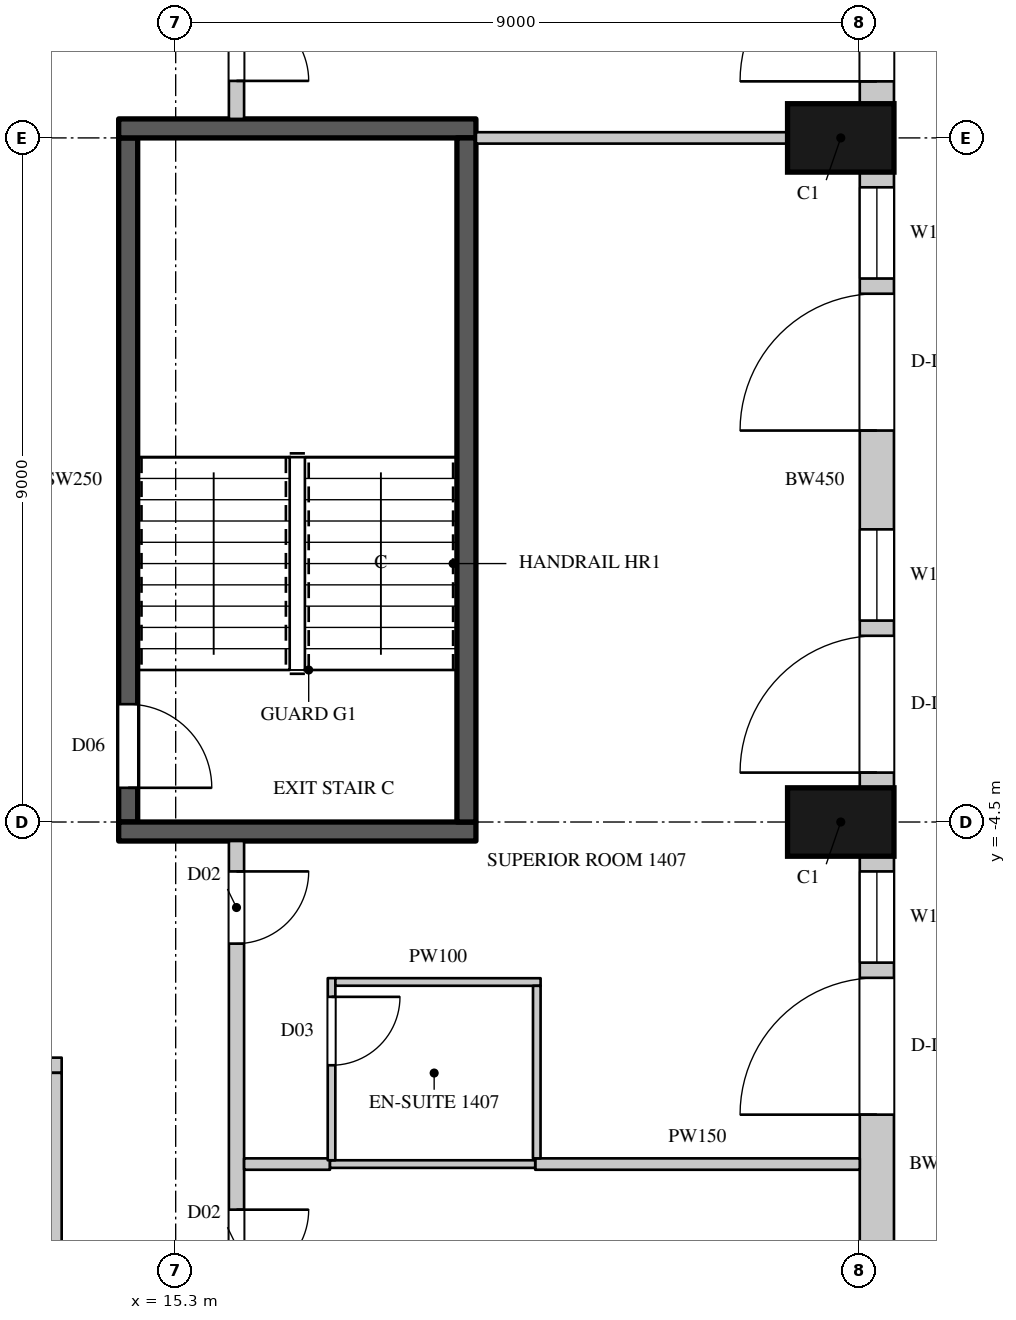
"""IFC4 building model, lengths in metres.
Left out: names, types, materials, properties, quantities, classifications, styles, units other than length and angle.
Written with IfcOpenShell. Run it as: python <this file> out.ifc"""

import sys

from ifc_helpers import new_model, si_unit, direction, frame, frame_2d, origin, origin_2d, place, context, subcontext, project, spatial, rectangle, extrude, element, fill, save


model = new_model("IFC4")
c1 = context("Model", 3, precision=1e-05, world=origin(), true_north=direction((0.0, 1.0)))
c2 = subcontext(c1, "Body", "Model", "MODEL_VIEW")
j1 = project(units=[si_unit("LENGTHUNIT", "METRE"), si_unit("PLANEANGLEUNIT", "RADIAN")], contexts=[c1])
p1 = place(None, origin())
s1 = spatial("IfcSite", under=j1, at=p1, CompositionType="ELEMENT")
p2 = place(p1, origin())
s2 = spatial("IfcBuilding", under=s1, at=p2, CompositionType="ELEMENT")
p3 = place(p2, frame((0.0, 0.0, 80.7)))
s3 = spatial("IfcBuildingStorey", under=s2, at=p3, CompositionType="ELEMENT", Elevation=80.7)
for number, where, z_axis, x_axis in (
    (1, (24.05, -4.5, 0.0), (0.0, 0.0, 1.0), (0.0, 1.0, 0.0)),
    (2, (24.05, 4.5, 0.0), (0.0, 0.0, 1.0), (0.0, 1.0, 0.0)),
):
    element("IfcColumn", number, at=place(p3, frame(where, z_axis=z_axis, x_axis=x_axis)), inside=s3, PredefinedType="COLUMN", context=c2, shape_type="SweptSolid", body=[
        extrude(rectangle(XDim=0.9, YDim=1.4, at=origin_2d()), origin(), (0.0, 0.0, 1.0), 3.6),
    ])
p4 = place(p3, frame((24.525, -13.05, 0.0), z_axis=(0.0, 0.0, 1.0), x_axis=(0.0, 1.0, 0.0)))
e3 = element("IfcWall", 3, at=p4, inside=s3, PredefinedType="SOLIDWALL", context=c2, shape_type="SweptSolid", body=[
    extrude(rectangle(XDim=8.1, YDim=0.45, at=frame_2d((4.05, 0.0))), origin(), (0.0, 0.0, 1.0), 3.3),
])
p5 = place(p4, frame((0.9, 0.0, 0.0)))
e4 = element("IfcOpeningElement", 4, at=p5, cuts=e3, PredefinedType="OPENING", context=c2, shape_type="SweptSolid", body=[
    extrude(rectangle(XDim=1.8, YDim=2.4, at=frame_2d((0.9, 1.2))), frame((0.0, 0.235, 0.0), z_axis=(0.0, -1.0, 0.0), x_axis=(1.0, 0.0, 0.0)), (0.0, 0.0, 1.0), 0.47),
])
p6 = place(p4, frame((4.7, 0.0, 0.0)))
e5 = element("IfcOpeningElement", 5, at=p6, cuts=e3, PredefinedType="OPENING", context=c2, shape_type="SweptSolid", body=[
    extrude(rectangle(XDim=1.8, YDim=2.4, at=frame_2d((0.9, 1.2))), frame((0.0, 0.235, 0.0), z_axis=(0.0, -1.0, 0.0), x_axis=(1.0, 0.0, 0.0)), (0.0, 0.0, 1.0), 0.47),
])
p7 = place(p4, frame((6.7, 0.0, 1.05)))
e6 = element("IfcOpeningElement", 6, at=p7, cuts=e3, PredefinedType="OPENING", context=c2, shape_type="SweptSolid", body=[
    extrude(rectangle(XDim=1.2, YDim=2.0, at=frame_2d((0.6, 1.0))), frame((0.0, 0.235, 0.0), z_axis=(0.0, -1.0, 0.0), x_axis=(1.0, 0.0, 0.0)), (0.0, 0.0, 1.0), 0.47),
])
p8 = place(p3, frame((24.525, -4.05, 0.0), z_axis=(0.0, 0.0, 1.0), x_axis=(0.0, 1.0, 0.0)))
e7 = element("IfcWall", 7, at=p8, inside=s3, PredefinedType="SOLIDWALL", context=c2, shape_type="SweptSolid", body=[
    extrude(rectangle(XDim=8.1, YDim=0.45, at=frame_2d((4.05, 0.0))), origin(), (0.0, 0.0, 1.0), 3.3),
])
p9 = place(p8, frame((0.2, 0.0, 0.0)))
e8 = element("IfcOpeningElement", 8, at=p9, cuts=e7, PredefinedType="OPENING", context=c2, shape_type="SweptSolid", body=[
    extrude(rectangle(XDim=1.8, YDim=2.4, at=frame_2d((0.9, 1.2))), frame((0.0, 0.235, 0.0), z_axis=(0.0, -1.0, 0.0), x_axis=(1.0, 0.0, 0.0)), (0.0, 0.0, 1.0), 0.47),
])
p10 = place(p8, frame((2.2, 0.0, 1.05)))
e9 = element("IfcOpeningElement", 9, at=p10, cuts=e7, PredefinedType="OPENING", context=c2, shape_type="SweptSolid", body=[
    extrude(rectangle(XDim=1.2, YDim=2.0, at=frame_2d((0.6, 1.0))), frame((0.0, 0.235, 0.0), z_axis=(0.0, -1.0, 0.0), x_axis=(1.0, 0.0, 0.0)), (0.0, 0.0, 1.0), 0.47),
])
p11 = place(p8, frame((4.7, 0.0, 0.0)))
e10 = element("IfcOpeningElement", 10, at=p11, cuts=e7, PredefinedType="OPENING", context=c2, shape_type="SweptSolid", body=[
    extrude(rectangle(XDim=1.8, YDim=2.4, at=frame_2d((0.9, 1.2))), frame((0.0, 0.235, 0.0), z_axis=(0.0, -1.0, 0.0), x_axis=(1.0, 0.0, 0.0)), (0.0, 0.0, 1.0), 0.47),
])
p12 = place(p8, frame((6.7, 0.0, 1.05)))
e11 = element("IfcOpeningElement", 11, at=p12, cuts=e7, PredefinedType="OPENING", context=c2, shape_type="SweptSolid", body=[
    extrude(rectangle(XDim=1.2, YDim=2.0, at=frame_2d((0.6, 1.0))), frame((0.0, 0.235, 0.0), z_axis=(0.0, -1.0, 0.0), x_axis=(1.0, 0.0, 0.0)), (0.0, 0.0, 1.0), 0.47),
])
p13 = place(p3, frame((24.525, 4.95, 0.0), z_axis=(0.0, 0.0, 1.0), x_axis=(0.0, 1.0, 0.0)))
e12 = element("IfcWall", 12, at=p13, inside=s3, PredefinedType="SOLIDWALL", context=c2, shape_type="SweptSolid", body=[
    extrude(rectangle(XDim=8.439, YDim=0.45, at=frame_2d((4.219, 0.0))), origin(), (0.0, 0.0, 1.0), 3.3),
])
p14 = place(p13, frame((0.294, 0.0, 0.0)))
e13 = element("IfcOpeningElement", 13, at=p14, cuts=e12, PredefinedType="OPENING", context=c2, shape_type="SweptSolid", body=[
    extrude(rectangle(XDim=1.8, YDim=2.4, at=frame_2d((0.9, 1.2))), frame((0.0, 0.235, 0.0), z_axis=(0.0, -1.0, 0.0), x_axis=(1.0, 0.0, 0.0)), (0.0, 0.0, 1.0), 0.47),
])
p15 = place(p13, frame((2.294, 0.0, 1.05)))
e14 = element("IfcOpeningElement", 14, at=p15, cuts=e12, PredefinedType="OPENING", context=c2, shape_type="SweptSolid", body=[
    extrude(rectangle(XDim=1.2, YDim=2.0, at=frame_2d((0.6, 1.0))), frame((0.0, 0.235, 0.0), z_axis=(0.0, -1.0, 0.0), x_axis=(1.0, 0.0, 0.0)), (0.0, 0.0, 1.0), 0.47),
])
p16 = place(p13, frame((5.232, 0.0, 1.05)))
e15 = element("IfcOpeningElement", 15, at=p16, cuts=e12, PredefinedType="OPENING", context=c2, shape_type="SweptSolid", body=[
    extrude(rectangle(XDim=2.7, YDim=2.0, at=frame_2d((1.35, 1.0))), frame((0.0, 0.235, 0.0), z_axis=(0.0, -1.0, 0.0), x_axis=(1.0, 0.0, 0.0)), (0.0, 0.0, 1.0), 0.47),
])
p17 = place(p3, frame((10.1, -7.7, 0.0), z_axis=(0.0, 0.0, 1.0), x_axis=(1.0, 0.0, 0.0)))
e16 = element("IfcWall", 16, at=p17, inside=s3, PredefinedType="PARTITIONING", context=c2, shape_type="SweptSolid", body=[
    extrude(rectangle(XDim=3.7, YDim=0.2, at=frame_2d((1.85, 0.0))), origin(), (0.0, 0.0, 1.0), 3.3),
])
p18 = place(p17, frame((2.45, 0.0, 0.0)))
e17 = element("IfcOpeningElement", 17, at=p18, cuts=e16, PredefinedType="OPENING", context=c2, shape_type="SweptSolid", body=[
    extrude(rectangle(XDim=0.9, YDim=2.2, at=frame_2d((0.45, 1.1))), frame((0.0, 0.11, 0.0), z_axis=(0.0, -1.0, 0.0), x_axis=(1.0, 0.0, 0.0)), (0.0, 0.0, 1.0), 0.22),
])
p19 = place(p3, frame((13.7, -15.0, 0.0), z_axis=(0.0, 0.0, 1.0), x_axis=(0.0, 1.0, 0.0)))
e18 = element("IfcWall", 18, at=p19, inside=s3, PredefinedType="PARTITIONING", context=c2, shape_type="SweptSolid", body=[
    extrude(rectangle(XDim=7.2, YDim=0.2, at=frame_2d((3.6, 0.0))), origin(), (0.0, 0.0, 1.0), 3.3),
])
p20 = place(p3, frame((16.1, -17.5, 0.0), z_axis=(0.0, 0.0, 1.0), x_axis=(0.0, 1.0, 0.0)))
e19 = element("IfcWall", 19, at=p20, inside=s3, PredefinedType="PARTITIONING", context=c2, shape_type="SweptSolid", body=[
    extrude(rectangle(XDim=12.75, YDim=0.2, at=frame_2d((6.375, 0.0))), origin(), (0.0, 0.0, 1.0), 3.3),
])
p21 = place(p20, frame((2.75, 0.0, 0.0)))
e20 = element("IfcOpeningElement", 20, at=p21, cuts=e19, PredefinedType="OPENING", context=c2, shape_type="SweptSolid", body=[
    extrude(rectangle(XDim=0.95, YDim=2.2, at=frame_2d((0.475, 1.1))), frame((0.0, 0.11, 0.0), z_axis=(0.0, -1.0, 0.0), x_axis=(1.0, 0.0, 0.0)), (0.0, 0.0, 1.0), 0.22),
])
p22 = place(p20, frame((6.95, 0.0, 0.0)))
e21 = element("IfcOpeningElement", 21, at=p22, cuts=e19, PredefinedType="OPENING", context=c2, shape_type="SweptSolid", body=[
    extrude(rectangle(XDim=0.95, YDim=2.2, at=frame_2d((0.475, 1.1))), frame((0.0, 0.11, 0.0), z_axis=(0.0, -1.0, 0.0), x_axis=(1.0, 0.0, 0.0)), (0.0, 0.0, 1.0), 0.22),
])
p23 = place(p20, frame((11.4, 0.0, 0.0)))
e22 = element("IfcOpeningElement", 22, at=p23, cuts=e19, PredefinedType="OPENING", context=c2, shape_type="SweptSolid", body=[
    extrude(rectangle(XDim=0.95, YDim=2.2, at=frame_2d((0.475, 1.1))), frame((0.0, 0.11, 0.0), z_axis=(0.0, -1.0, 0.0), x_axis=(1.0, 0.0, 0.0)), (0.0, 0.0, 1.0), 0.22),
])
p24 = place(p3, frame((16.1, 4.75, 0.0), z_axis=(0.0, 0.0, 1.0), x_axis=(0.0, 1.0, 0.0)))
e23 = element("IfcWall", 23, at=p24, inside=s3, PredefinedType="PARTITIONING", context=c2, shape_type="SweptSolid", body=[
    extrude(rectangle(XDim=12.65, YDim=0.2, at=frame_2d((6.325, 0.0))), origin(), (0.0, 0.0, 1.0), 3.3),
])
p25 = place(p24, frame((0.5, 0.0, 0.0)))
e24 = element("IfcOpeningElement", 24, at=p25, cuts=e23, PredefinedType="OPENING", context=c2, shape_type="SweptSolid", body=[
    extrude(rectangle(XDim=0.95, YDim=2.2, at=frame_2d((0.475, 1.1))), frame((0.0, 0.11, 0.0), z_axis=(0.0, -1.0, 0.0), x_axis=(1.0, 0.0, 0.0)), (0.0, 0.0, 1.0), 0.22),
])
p26 = place(p24, frame((6.9, 0.0, 0.0)))
e25 = element("IfcOpeningElement", 25, at=p26, cuts=e23, PredefinedType="OPENING", context=c2, shape_type="SweptSolid", body=[
    extrude(rectangle(XDim=0.95, YDim=2.2, at=frame_2d((0.475, 1.1))), frame((0.0, 0.11, 0.0), z_axis=(0.0, -1.0, 0.0), x_axis=(1.0, 0.0, 0.0)), (0.0, 0.0, 1.0), 0.22),
])
p27 = place(p3, frame((16.2, -9.0, 0.0), z_axis=(0.0, 0.0, 1.0), x_axis=(1.0, 0.0, 0.0)))
e26 = element("IfcWall", 26, at=p27, inside=s3, PredefinedType="PARTITIONING", context=c2, shape_type="SweptSolid", body=[
    extrude(rectangle(XDim=1.13, YDim=0.15, at=frame_2d((0.565, 0.0))), origin(), (0.0, 0.0, 1.0), 2.65),
])
p28 = place(p3, frame((19.25, 4.5, 0.0), z_axis=(0.0, 0.0, 1.0), x_axis=(1.0, 0.0, 0.0)))
e27 = element("IfcWall", 27, at=p28, inside=s3, PredefinedType="PARTITIONING", context=c2, shape_type="SweptSolid", body=[
    extrude(rectangle(XDim=4.1, YDim=0.15, at=frame_2d((2.05, 0.0))), origin(), (0.0, 0.0, 1.0), 3.3),
])
p29 = place(p3, frame((20.03, -9.0, 0.0), z_axis=(0.0, 0.0, 1.0), x_axis=(1.0, 0.0, 0.0)))
e28 = element("IfcWall", 28, at=p29, inside=s3, PredefinedType="PARTITIONING", context=c2, shape_type="SweptSolid", body=[
    extrude(rectangle(XDim=4.27, YDim=0.15, at=frame_2d((2.135, 0.0))), origin(), (0.0, 0.0, 1.0), 2.65),
])
p30 = place(p3, frame((14.675, -4.5, 0.0), z_axis=(0.0, 0.0, 1.0), x_axis=(0.0, 1.0, 0.0)))
e29 = element("IfcWall", 29, at=p30, inside=s3, PredefinedType="SHEAR", context=c2, shape_type="SweptSolid", body=[
    extrude(rectangle(XDim=9.0, YDim=0.25, at=frame_2d((4.5, 0.0))), origin(), (0.0, 0.0, 1.0), 3.3),
])
p31 = place(p30, frame((0.45, 0.0, 0.0)))
e30 = element("IfcOpeningElement", 30, at=p31, cuts=e29, PredefinedType="OPENING", context=c2, shape_type="SweptSolid", body=[
    extrude(rectangle(XDim=1.1, YDim=2.2, at=frame_2d((0.55, 1.1))), frame((0.0, 0.135, 0.0), z_axis=(0.0, -1.0, 0.0), x_axis=(1.0, 0.0, 0.0)), (0.0, 0.0, 1.0), 0.27),
])
for number, where, z_axis, x_axis in (
    (31, (14.55, -4.625, 0.0), (0.0, 0.0, 1.0), (1.0, 0.0, 0.0)),
    (32, (14.55, 4.625, 0.0), (0.0, 0.0, 1.0), (1.0, 0.0, 0.0)),
):
    element("IfcWall", number, at=place(p3, frame(where, z_axis=z_axis, x_axis=x_axis)), inside=s3, PredefinedType="SHEAR", context=c2, shape_type="SweptSolid", body=[
        extrude(rectangle(XDim=4.7, YDim=0.25, at=frame_2d((2.35, 0.0))), origin(), (0.0, 0.0, 1.0), 3.3),
    ])
p32 = place(p3, frame((19.125, -4.5, 0.0), z_axis=(0.0, 0.0, 1.0), x_axis=(0.0, 1.0, 0.0)))
e33 = element("IfcWall", 33, at=p32, inside=s3, PredefinedType="SHEAR", context=c2, shape_type="SweptSolid", body=[
    extrude(rectangle(XDim=9.0, YDim=0.25, at=frame_2d((4.5, 0.0))), origin(), (0.0, 0.0, 1.0), 3.3),
])
p33 = place(p3, frame((17.33, -9.0, 0.0), z_axis=(0.0, 0.0, 1.0), x_axis=(1.0, 0.0, 0.0)))
e34 = element("IfcWall", 34, at=p33, inside=s3, PredefinedType="PARTITIONING", context=c2, shape_type="SweptSolid", body=[
    extrude(rectangle(XDim=2.7, YDim=0.1, at=frame_2d((1.35, 0.0))), origin(), (0.0, 0.0, 1.0), 2.65),
])
p34 = place(p3, frame((17.35, -8.95, 0.0), z_axis=(0.0, 0.0, 1.0), x_axis=(0.000407580973, 0.999999916939, 0.0)))
e35 = element("IfcWall", 35, at=p34, inside=s3, PredefinedType="PARTITIONING", context=c2, shape_type="SweptSolid", body=[
    extrude(rectangle(XDim=2.396, YDim=0.1, at=frame_2d((1.198, 0.0))), origin(), (0.0, 0.0, 1.0), 3.3),
])
p35 = place(p34, frame((1.25, 0.0, 0.0)))
e36 = element("IfcOpeningElement", 36, at=p35, cuts=e35, PredefinedType="OPENING", context=c2, shape_type="SweptSolid", body=[
    extrude(rectangle(XDim=0.9, YDim=2.2, at=frame_2d((0.45, 1.1))), frame((0.0, 0.06, 0.0), z_axis=(0.0, -1.0, 0.0), x_axis=(1.0, 0.0, 0.0)), (0.0, 0.0, 1.0), 0.12),
])
p36 = place(p3, frame((17.401, -6.604, 0.0), z_axis=(0.0, 0.0, 1.0), x_axis=(0.9999999346, -0.000361663629, 0.0)))
e37 = element("IfcWall", 37, at=p36, inside=s3, PredefinedType="PARTITIONING", context=c2, shape_type="SweptSolid", body=[
    extrude(rectangle(XDim=2.7, YDim=0.1, at=frame_2d((1.35, 0.0))), origin(), (0.0, 0.0, 1.0), 3.3),
])
p37 = place(p3, frame((20.05, -8.925, 0.0), z_axis=(0.0, 0.0, 1.0), x_axis=(0.000430200003, 0.999999907464, 0.0)))
e38 = element("IfcWall", 38, at=p37, inside=s3, PredefinedType="PARTITIONING", context=c2, shape_type="SweptSolid", body=[
    extrude(rectangle(XDim=2.27, YDim=0.1, at=frame_2d((1.135, 0.0))), origin(), (0.0, 0.0, 1.0), 3.3),
])
p38 = place(p6, origin())
e39 = element("IfcDoor", 39, at=p38, inside=s3, OperationType="SLIDING_TO_LEFT", PredefinedType="DOOR", context=c2, shape_type="SweptSolid", body=[
    extrude(rectangle(XDim=1.8, YDim=2.4, at=frame_2d((0.9, 1.2))), frame((0.0, 0.13, 0.0), z_axis=(0.0, -1.0, 0.0), x_axis=(1.0, 0.0, 0.0)), (0.0, 0.0, 1.0), 0.05),
])
fill(e5, e39)
p39 = place(p7, origin())
e40 = element("IfcWindow", 40, at=p39, inside=s3, PartitioningType="SINGLE_PANEL", PredefinedType="WINDOW", context=c2, shape_type="SweptSolid", body=[
    extrude(rectangle(XDim=1.2, YDim=2.0, at=frame_2d((0.6, 1.0))), frame((0.0, 0.135, 0.0), z_axis=(0.0, -1.0, 0.0), x_axis=(1.0, 0.0, 0.0)), (0.0, 0.0, 1.0), 0.06),
])
fill(e6, e40)
p40 = place(p9, origin())
e41 = element("IfcDoor", 41, at=p40, inside=s3, OperationType="SLIDING_TO_LEFT", PredefinedType="DOOR", context=c2, shape_type="SweptSolid", body=[
    extrude(rectangle(XDim=1.8, YDim=2.4, at=frame_2d((0.9, 1.2))), frame((0.0, 0.13, 0.0), z_axis=(0.0, -1.0, 0.0), x_axis=(1.0, 0.0, 0.0)), (0.0, 0.0, 1.0), 0.05),
])
fill(e8, e41)
p41 = place(p10, origin())
e42 = element("IfcWindow", 42, at=p41, inside=s3, PartitioningType="SINGLE_PANEL", PredefinedType="WINDOW", context=c2, shape_type="SweptSolid", body=[
    extrude(rectangle(XDim=1.2, YDim=2.0, at=frame_2d((0.6, 1.0))), frame((0.0, 0.135, 0.0), z_axis=(0.0, -1.0, 0.0), x_axis=(1.0, 0.0, 0.0)), (0.0, 0.0, 1.0), 0.06),
])
fill(e9, e42)
p42 = place(p11, origin())
e43 = element("IfcDoor", 43, at=p42, inside=s3, OperationType="SLIDING_TO_LEFT", PredefinedType="DOOR", context=c2, shape_type="SweptSolid", body=[
    extrude(rectangle(XDim=1.8, YDim=2.4, at=frame_2d((0.9, 1.2))), frame((0.0, 0.13, 0.0), z_axis=(0.0, -1.0, 0.0), x_axis=(1.0, 0.0, 0.0)), (0.0, 0.0, 1.0), 0.05),
])
fill(e10, e43)
p43 = place(p12, origin())
e44 = element("IfcWindow", 44, at=p43, inside=s3, PartitioningType="SINGLE_PANEL", PredefinedType="WINDOW", context=c2, shape_type="SweptSolid", body=[
    extrude(rectangle(XDim=1.2, YDim=2.0, at=frame_2d((0.6, 1.0))), frame((0.0, 0.135, 0.0), z_axis=(0.0, -1.0, 0.0), x_axis=(1.0, 0.0, 0.0)), (0.0, 0.0, 1.0), 0.06),
])
fill(e11, e44)
p44 = place(p14, origin())
e45 = element("IfcDoor", 45, at=p44, inside=s3, OperationType="SLIDING_TO_LEFT", PredefinedType="DOOR", context=c2, shape_type="SweptSolid", body=[
    extrude(rectangle(XDim=1.8, YDim=2.4, at=frame_2d((0.9, 1.2))), frame((0.0, 0.13, 0.0), z_axis=(0.0, -1.0, 0.0), x_axis=(1.0, 0.0, 0.0)), (0.0, 0.0, 1.0), 0.05),
])
fill(e13, e45)
p45 = place(p22, origin())
e46 = element("IfcDoor", 46, at=p45, inside=s3, OperationType="SINGLE_SWING_LEFT", PredefinedType="DOOR", context=c2, shape_type="SweptSolid", body=[
    extrude(rectangle(XDim=0.95, YDim=2.2, at=frame_2d((0.475, 1.1))), frame((0.0, 0.025, 0.0), z_axis=(0.0, -1.0, 0.0), x_axis=(1.0, 0.0, 0.0)), (0.0, 0.0, 1.0), 0.05),
])
fill(e21, e46)
p46 = place(p23, origin())
e47 = element("IfcDoor", 47, at=p46, inside=s3, OperationType="SINGLE_SWING_LEFT", PredefinedType="DOOR", context=c2, shape_type="SweptSolid", body=[
    extrude(rectangle(XDim=0.95, YDim=2.2, at=frame_2d((0.475, 1.1))), frame((0.0, 0.025, 0.0), z_axis=(0.0, -1.0, 0.0), x_axis=(1.0, 0.0, 0.0)), (0.0, 0.0, 1.0), 0.05),
])
fill(e22, e47)
p47 = place(p35, origin())
e48 = element("IfcDoor", 48, at=p47, inside=s3, OperationType="SINGLE_SWING_LEFT", PredefinedType="DOOR", context=c2, shape_type="SweptSolid", body=[
    extrude(rectangle(XDim=0.9, YDim=2.2, at=frame_2d((0.45, 1.1))), frame((0.0, 0.025, 0.0), z_axis=(0.0, -1.0, 0.0), x_axis=(1.0, 0.0, 0.0)), (0.0, 0.0, 1.0), 0.05),
])
fill(e36, e48)
p48 = place(p25, origin())
e49 = element("IfcDoor", 49, at=p48, inside=s3, OperationType="SINGLE_SWING_RIGHT", PredefinedType="DOOR", context=c2, shape_type="SweptSolid", body=[
    extrude(rectangle(XDim=0.95, YDim=2.2, at=frame_2d((0.475, 1.1))), frame((0.0, 0.025, 0.0), z_axis=(0.0, -1.0, 0.0), x_axis=(1.0, 0.0, 0.0)), (0.0, 0.0, 1.0), 0.05),
])
fill(e24, e49)
p49 = place(p31, origin())
e50 = element("IfcDoor", 50, at=p49, inside=s3, OperationType="SINGLE_SWING_RIGHT", PredefinedType="DOOR", context=c2, shape_type="SweptSolid", body=[
    extrude(rectangle(XDim=1.1, YDim=2.2, at=frame_2d((0.55, 1.1))), frame((0.0, 0.025, 0.0), z_axis=(0.0, -1.0, 0.0), x_axis=(1.0, 0.0, 0.0)), (0.0, 0.0, 1.0), 0.05),
])
fill(e30, e50)
save(model, sys.argv[1])
